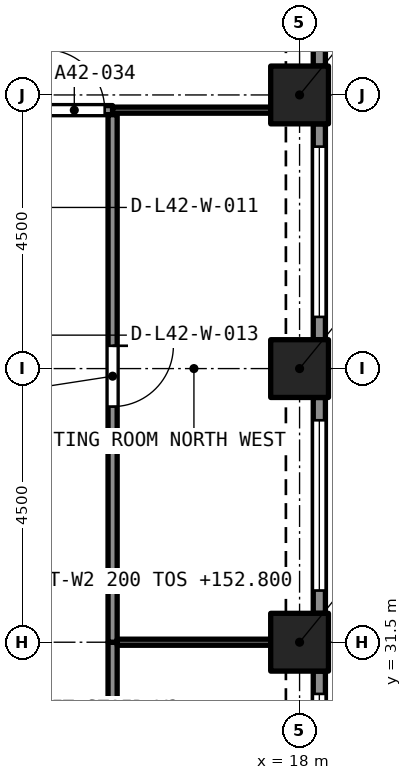
"""IFC4 building model, lengths in metres.
Left out: names, types, materials, properties, quantities, classifications, styles, units other than length and angle.
Written with IfcOpenShell. Run it as: python <this file> out.ifc"""

import sys

from ifc_helpers import new_model, si_unit, direction, frame, frame_2d, origin, origin_2d, place, context, subcontext, project, spatial, rectangle, extrude, element, fill, save


model = new_model("IFC4")
c1 = context("Model", 3, precision=1e-05, world=origin(), true_north=direction((0.0, 1.0)))
c2 = subcontext(c1, "Body", "Model", "MODEL_VIEW")
j1 = project(units=[si_unit("LENGTHUNIT", "METRE"), si_unit("PLANEANGLEUNIT", "RADIAN")], contexts=[c1])
p1 = place(None, origin())
s1 = spatial("IfcSite", under=j1, at=p1, CompositionType="ELEMENT")
p2 = place(p1, origin())
s2 = spatial("IfcBuilding", under=s1, at=p2, CompositionType="ELEMENT")
p3 = place(p2, frame((0.0, 0.0, 150.6)))
s3 = spatial("IfcBuildingStorey", under=s2, at=p3, CompositionType="ELEMENT", Elevation=150.6)
for number, where, z_axis, x_axis in (
    (1, (18.0, 31.5, 0.0), (0.0, 0.0, 1.0), (1.0, 0.0, 0.0)),
    (2, (18.0, 36.0, 0.0), (0.0, 0.0, 1.0), (1.0, 0.0, 0.0)),
    (3, (18.0, 40.5, 0.0), (0.0, 0.0, 1.0), (1.0, 0.0, 0.0)),
):
    element("IfcColumn", number, at=place(p3, frame(where, z_axis=z_axis, x_axis=x_axis)), inside=s3, PredefinedType="COLUMN", context=c2, shape_type="SweptSolid", body=[
        extrude(rectangle(XDim=0.95, YDim=0.95, at=origin_2d()), origin(), (0.0, 0.0, 1.0), 4.4),
    ])
p4 = place(p3, frame((18.325, 31.025, 0.0), z_axis=(0.0, 0.0, 1.0), x_axis=(0.0, -1.0, 0.0)))
e4 = element("IfcWall", 4, at=p4, inside=s3, PredefinedType="SOLIDWALL", context=c2, shape_type="SweptSolid", body=[
    extrude(rectangle(XDim=3.55, YDim=0.2, at=frame_2d((1.775, 0.0))), origin(), (0.0, 0.0, 1.0), 4.4),
])
p5 = place(p4, frame((0.375, 0.0, 0.45)))
e5 = element("IfcOpeningElement", 5, at=p5, cuts=e4, PredefinedType="OPENING", context=c2, shape_type="SweptSolid", body=[
    extrude(rectangle(XDim=2.8, YDim=2.55, at=frame_2d((1.4, 1.275))), frame((0.0, 0.11, 0.0), z_axis=(0.0, -1.0, 0.0), x_axis=(1.0, 0.0, 0.0)), (0.0, 0.0, 1.0), 0.22),
])
p6 = place(p3, frame((18.325, 35.525, 0.0), z_axis=(0.0, 0.0, 1.0), x_axis=(0.0, -1.0, 0.0)))
e6 = element("IfcWall", 6, at=p6, inside=s3, PredefinedType="SOLIDWALL", context=c2, shape_type="SweptSolid", body=[
    extrude(rectangle(XDim=3.55, YDim=0.2, at=frame_2d((1.775, 0.0))), origin(), (0.0, 0.0, 1.0), 4.4),
])
p7 = place(p6, frame((0.375, 0.0, 0.45)))
e7 = element("IfcOpeningElement", 7, at=p7, cuts=e6, PredefinedType="OPENING", context=c2, shape_type="SweptSolid", body=[
    extrude(rectangle(XDim=2.8, YDim=2.55, at=frame_2d((1.4, 1.275))), frame((0.0, 0.11, 0.0), z_axis=(0.0, -1.0, 0.0), x_axis=(1.0, 0.0, 0.0)), (0.0, 0.0, 1.0), 0.22),
])
p8 = place(p3, frame((18.325, 40.025, 0.0), z_axis=(0.0, 0.0, 1.0), x_axis=(0.0, -1.0, 0.0)))
e8 = element("IfcWall", 8, at=p8, inside=s3, PredefinedType="SOLIDWALL", context=c2, shape_type="SweptSolid", body=[
    extrude(rectangle(XDim=3.55, YDim=0.2, at=frame_2d((1.775, 0.0))), origin(), (0.0, 0.0, 1.0), 4.4),
])
p9 = place(p8, frame((0.375, 0.0, 0.45)))
e9 = element("IfcOpeningElement", 9, at=p9, cuts=e8, PredefinedType="OPENING", context=c2, shape_type="SweptSolid", body=[
    extrude(rectangle(XDim=2.8, YDim=2.55, at=frame_2d((1.4, 1.275))), frame((0.0, 0.11, 0.0), z_axis=(0.0, -1.0, 0.0), x_axis=(1.0, 0.0, 0.0)), (0.0, 0.0, 1.0), 0.22),
])
p10 = place(p3, frame((18.325, 44.525, 0.0), z_axis=(0.0, 0.0, 1.0), x_axis=(0.0, -1.0, 0.0)))
e10 = element("IfcWall", 10, at=p10, inside=s3, PredefinedType="SOLIDWALL", context=c2, shape_type="SweptSolid", body=[
    extrude(rectangle(XDim=3.55, YDim=0.2, at=frame_2d((1.775, 0.0))), origin(), (0.0, 0.0, 1.0), 4.4),
])
p11 = place(p10, frame((0.375, 0.0, 0.45)))
e11 = element("IfcOpeningElement", 11, at=p11, cuts=e10, PredefinedType="OPENING", context=c2, shape_type="SweptSolid", body=[
    extrude(rectangle(XDim=2.8, YDim=2.55, at=frame_2d((1.4, 1.275))), frame((0.0, 0.11, 0.0), z_axis=(0.0, -1.0, 0.0), x_axis=(1.0, 0.0, 0.0)), (0.0, 0.0, 1.0), 0.22),
])
p12 = place(p3, frame((13.25, 40.25, 0.0), z_axis=(0.0, 0.0, 1.0), x_axis=(1.0, 0.0, 0.0)))
e12 = element("IfcWall", 12, at=p12, inside=s3, PredefinedType="PARTITIONING", context=c2, shape_type="SweptSolid", body=[
    extrude(rectangle(XDim=1.675, YDim=0.15, at=frame_2d((0.837, 0.0))), origin(), (0.0, 0.0, 1.0), 4.1),
])
p13 = place(p12, frame((0.545, 0.0, 0.0)))
e13 = element("IfcOpeningElement", 13, at=p13, cuts=e12, PredefinedType="OPENING", context=c2, shape_type="SweptSolid", body=[
    extrude(rectangle(XDim=1.0, YDim=2.1, at=frame_2d((0.5, 1.05))), frame((0.0, 0.085, 0.0), z_axis=(0.0, -1.0, 0.0), x_axis=(1.0, 0.0, 0.0)), (0.0, 0.0, 1.0), 0.17),
])
p14 = place(p3, frame((14.925, 40.25, 0.0), z_axis=(0.0, 0.0, 1.0), x_axis=(1.0, 0.0, 0.0)))
e14 = element("IfcWall", 14, at=p14, inside=s3, PredefinedType="PARTITIONING", context=c2, shape_type="SweptSolid", body=[
    extrude(rectangle(XDim=2.6, YDim=0.1, at=frame_2d((1.3, 0.0))), origin(), (0.0, 0.0, 1.0), 4.1),
])
p15 = place(p3, frame((14.925, 27.325, 0.0), z_axis=(0.0, 0.0, 1.0), x_axis=(0.0, 1.0, 0.0)))
e15 = element("IfcWall", 15, at=p15, inside=s3, PredefinedType="PARTITIONING", context=c2, shape_type="SweptSolid", body=[
    extrude(rectangle(XDim=4.175, YDim=0.15, at=frame_2d((2.087, 0.0))), origin(), (0.0, 0.0, 1.0), 4.1),
])
p16 = place(p3, frame((14.925, 40.175, 0.0), z_axis=(0.0, 0.0, 1.0), x_axis=(0.0, -1.0, 0.0)))
e16 = element("IfcWall", 16, at=p16, inside=s3, PredefinedType="PARTITIONING", context=c2, shape_type="SweptSolid", body=[
    extrude(rectangle(XDim=8.675, YDim=0.15, at=frame_2d((4.337, 0.0))), origin(), (0.0, 0.0, 1.0), 4.1),
])
p17 = place(p16, frame((3.8, 0.0, 0.0)))
e17 = element("IfcOpeningElement", 17, at=p17, cuts=e16, PredefinedType="OPENING", context=c2, shape_type="SweptSolid", body=[
    extrude(rectangle(XDim=1.0, YDim=2.1, at=frame_2d((0.5, 1.05))), frame((0.0, 0.085, 0.0), z_axis=(0.0, -1.0, 0.0), x_axis=(1.0, 0.0, 0.0)), (0.0, 0.0, 1.0), 0.17),
])
p18 = place(p3, frame((15.0, 31.5, 0.0), z_axis=(0.0, 0.0, 1.0), x_axis=(1.0, 0.0, 0.0)))
e18 = element("IfcWall", 18, at=p18, inside=s3, PredefinedType="PARTITIONING", context=c2, shape_type="SweptSolid", body=[
    extrude(rectangle(XDim=2.525, YDim=0.1, at=frame_2d((1.262, 0.0))), origin(), (0.0, 0.0, 1.0), 4.1),
])
p19 = place(p5, origin())
e19 = element("IfcWindow", 19, at=p19, inside=s3, PartitioningType="SINGLE_PANEL", PredefinedType="WINDOW", context=c2, shape_type="SweptSolid", body=[
    extrude(rectangle(XDim=2.8, YDim=2.55, at=frame_2d((1.4, 1.275))), frame((0.0, 0.03, 0.0), z_axis=(0.0, -1.0, 0.0), x_axis=(1.0, 0.0, 0.0)), (0.0, 0.0, 1.0), 0.06),
])
fill(e5, e19)
p20 = place(p7, origin())
e20 = element("IfcWindow", 20, at=p20, inside=s3, PartitioningType="SINGLE_PANEL", PredefinedType="WINDOW", context=c2, shape_type="SweptSolid", body=[
    extrude(rectangle(XDim=2.8, YDim=2.55, at=frame_2d((1.4, 1.275))), frame((0.0, 0.03, 0.0), z_axis=(0.0, -1.0, 0.0), x_axis=(1.0, 0.0, 0.0)), (0.0, 0.0, 1.0), 0.06),
])
fill(e7, e20)
p21 = place(p9, origin())
e21 = element("IfcWindow", 21, at=p21, inside=s3, PartitioningType="SINGLE_PANEL", PredefinedType="WINDOW", context=c2, shape_type="SweptSolid", body=[
    extrude(rectangle(XDim=2.8, YDim=2.55, at=frame_2d((1.4, 1.275))), frame((0.0, 0.03, 0.0), z_axis=(0.0, -1.0, 0.0), x_axis=(1.0, 0.0, 0.0)), (0.0, 0.0, 1.0), 0.06),
])
fill(e9, e21)
p22 = place(p13, origin())
e22 = element("IfcDoor", 22, at=p22, inside=s3, OperationType="SINGLE_SWING_RIGHT", PredefinedType="DOOR", context=c2, shape_type="SweptSolid", body=[
    extrude(rectangle(XDim=1.0, YDim=2.1, at=frame_2d((0.5, 1.05))), frame((0.0, 0.025, 0.0), z_axis=(0.0, -1.0, 0.0), x_axis=(1.0, 0.0, 0.0)), (0.0, 0.0, 1.0), 0.05),
])
fill(e13, e22)
p23 = place(p17, origin())
e23 = element("IfcDoor", 23, at=p23, inside=s3, OperationType="SINGLE_SWING_LEFT", PredefinedType="DOOR", context=c2, shape_type="SweptSolid", body=[
    extrude(rectangle(XDim=1.0, YDim=2.1, at=frame_2d((0.5, 1.05))), frame((0.0, 0.025, 0.0), z_axis=(0.0, -1.0, 0.0), x_axis=(1.0, 0.0, 0.0)), (0.0, 0.0, 1.0), 0.05),
])
fill(e17, e23)
save(model, sys.argv[1])
